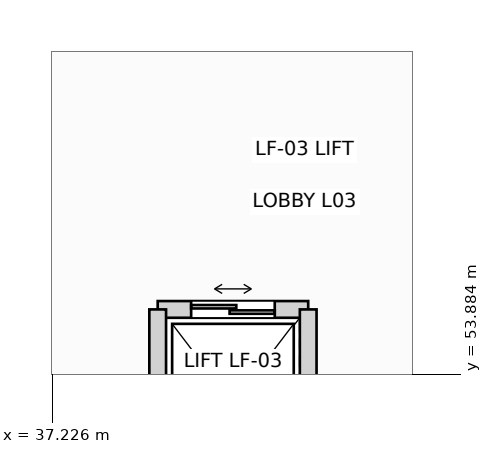
"""IFC4 building model, lengths in metres.
Left out: names, types, materials, properties, quantities, classifications, styles, units other than length and angle.
Written with IfcOpenShell. Run it as: python <this file> out.ifc"""

import sys

from ifc_helpers import new_model, si_unit, direction, frame, frame_2d, origin, place, context, subcontext, project, spatial, rectangle, extrude, element, fill, save


model = new_model("IFC4")
c1 = context("Model", 3, precision=1e-05, world=origin(), true_north=direction((0.0, 1.0)))
c2 = subcontext(c1, "Body", "Model", "MODEL_VIEW")
j1 = project(units=[si_unit("LENGTHUNIT", "METRE"), si_unit("PLANEANGLEUNIT", "RADIAN")], contexts=[c1])
p1 = place(None, origin())
s1 = spatial("IfcSite", under=j1, at=p1, CompositionType="ELEMENT")
p2 = place(p1, origin())
s2 = spatial("IfcBuilding", under=s1, at=p2, CompositionType="ELEMENT")
p3 = place(p2, frame((0.0, 0.0, 16.8)))
s3 = spatial("IfcBuildingStorey", under=s2, at=p3, CompositionType="ELEMENT", Elevation=16.8)
p4 = place(p3, frame((38.61, 54.74, 0.0), z_axis=(0.0, 0.0, 1.0), x_axis=(1.0, 0.0, 0.0)))
e1 = element("IfcWall", 1, at=p4, inside=s3, PredefinedType="PARTITIONING", context=c2, shape_type="SweptSolid", body=[
    extrude(rectangle(XDim=1.98, YDim=0.22, at=frame_2d((0.99, 0.0))), origin(), (0.0, 0.0, 1.0), 4.485),
])
p5 = place(p4, frame((0.44, 0.0, 0.0)))
e2 = element("IfcOpeningElement", 2, at=p5, cuts=e1, PredefinedType="OPENING", context=c2, shape_type="SweptSolid", body=[
    extrude(rectangle(XDim=1.1, YDim=2.18, at=frame_2d((0.55, 1.09))), frame((0.0, 0.12, 0.0), z_axis=(0.0, -1.0, 0.0), x_axis=(1.0, 0.0, 0.0)), (0.0, 0.0, 1.0), 0.24),
])
for number, where, z_axis, x_axis in (
    (3, (38.61, 52.26, 0.0), (0.0, 0.0, 1.0), (0.0, 1.0, 0.0)),
    (4, (40.59, 52.26, 0.0), (0.0, 0.0, 1.0), (0.0, 1.0, 0.0)),
):
    element("IfcWall", number, at=place(p3, frame(where, z_axis=z_axis, x_axis=x_axis)), inside=s3, PredefinedType="PARTITIONING", context=c2, shape_type="SweptSolid", body=[
        extrude(rectangle(XDim=2.48, YDim=0.22, at=frame_2d((1.24, 0.0))), origin(), (0.0, 0.0, 1.0), 4.485),
    ])
p6 = place(p5, origin())
e5 = element("IfcDoor", 5, at=p6, inside=s3, OperationType="DOUBLE_DOOR_SLIDING", PredefinedType="DOOR", context=c2, shape_type="SweptSolid", body=[
    extrude(rectangle(XDim=1.1, YDim=2.18, at=frame_2d((0.55, 1.09))), frame((0.0, 0.025, 0.0), z_axis=(0.0, -1.0, 0.0), x_axis=(1.0, 0.0, 0.0)), (0.0, 0.0, 1.0), 0.05),
])
fill(e2, e5)
save(model, sys.argv[1])
